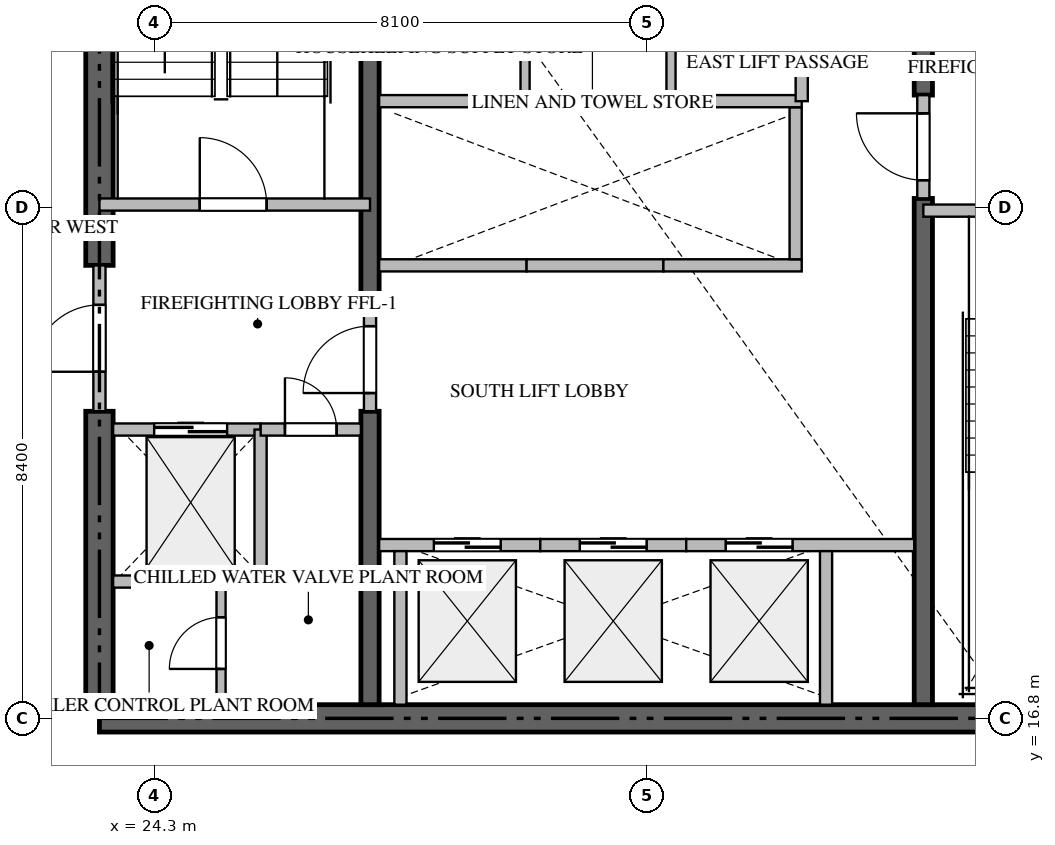
"""IFC4 building model, lengths in metres.
Left out: names, types, materials, properties, quantities, classifications, styles, units other than length and angle.
Written with IfcOpenShell. Run it as: python <this file> out.ifc"""

import sys

from ifc_helpers import new_model, si_unit, direction, frame, frame_2d, origin, place, context, subcontext, project, spatial, rectangle, extrude, source, transform, mapped, element, fill, save


model = new_model("IFC4")
c1 = context("Model", 3, precision=1e-05, world=origin(), true_north=direction((0.0, 1.0)))
c2 = subcontext(c1, "Body", "Model", "MODEL_VIEW")
j1 = project(units=[si_unit("LENGTHUNIT", "METRE"), si_unit("PLANEANGLEUNIT", "RADIAN")], contexts=[c1])
p1 = place(None, origin())
s1 = spatial("IfcSite", under=j1, at=p1, CompositionType="ELEMENT")
p2 = place(p1, origin())
s2 = spatial("IfcBuilding", under=s1, at=p2, CompositionType="ELEMENT")
p3 = place(p2, frame((0.0, 0.0, 79.2)))
s3 = spatial("IfcBuildingStorey", under=s2, at=p3, CompositionType="ELEMENT", Elevation=79.2)
p4 = place(p3, frame((23.4, 16.8, -0.26), z_axis=(0.0, 0.0, 1.0), x_axis=(1.0, 0.0, 0.0)))
e1 = element("IfcWall", 1, at=p4, inside=s3, PredefinedType="SHEAR", context=c2, shape_type="SweptSolid", body=[
    extrude(rectangle(XDim=18.0, YDim=0.45, at=frame_2d((9.0, 0.0))), origin(), (0.0, 0.0, 1.0), 3.748),
])
p5 = place(p3, frame((23.4, 17.025, -0.26), z_axis=(0.0, 0.0, 1.0), x_axis=(0.0, 1.0, 0.0)))
e2 = element("IfcWall", 2, at=p5, inside=s3, PredefinedType="SHEAR", context=c2, shape_type="SweptSolid", body=[
    extrude(rectangle(XDim=4.825, YDim=0.45, at=frame_2d((2.413, 0.0))), origin(), (0.0, 0.0, 1.0), 3.748),
])
p6 = place(p3, frame((23.4, 24.25, -0.26), z_axis=(0.0, 0.0, 1.0), x_axis=(0.0, 1.0, 0.0)))
e3 = element("IfcWall", 3, at=p6, inside=s3, PredefinedType="SHEAR", context=c2, shape_type="SweptSolid", body=[
    extrude(rectangle(XDim=9.125, YDim=0.45, at=frame_2d((4.562, 0.0))), origin(), (0.0, 0.0, 1.0), 3.748),
])
p7 = place(p3, frame((27.85, 17.025, -0.26), z_axis=(0.0, 0.0, 1.0), x_axis=(0.0, 1.0, 0.0)))
e4 = element("IfcWall", 4, at=p7, inside=s3, PredefinedType="SHEAR", context=c2, shape_type="SweptSolid", body=[
    extrude(rectangle(XDim=4.825, YDim=0.3, at=frame_2d((2.413, 0.0))), origin(), (0.0, 0.0, 1.0), 3.748),
])
p8 = place(p3, frame((27.85, 23.55, -0.26), z_axis=(0.0, 0.0, 1.0), x_axis=(0.0, 1.0, 0.0)))
e5 = element("IfcWall", 5, at=p8, inside=s3, PredefinedType="SHEAR", context=c2, shape_type="SweptSolid", body=[
    extrude(rectangle(XDim=9.825, YDim=0.3, at=frame_2d((4.913, 0.0))), origin(), (0.0, 0.0, 1.0), 3.748),
])
p9 = place(p3, frame((36.95, 17.025, -0.26), z_axis=(0.0, 0.0, 1.0), x_axis=(0.0, 1.0, 0.0)))
e6 = element("IfcWall", 6, at=p9, inside=s3, PredefinedType="SHEAR", context=c2, shape_type="SweptSolid", body=[
    extrude(rectangle(XDim=8.325, YDim=0.3, at=frame_2d((4.163, 0.0))), origin(), (0.0, 0.0, 1.0), 3.748),
])
p10 = place(p3, frame((36.95, 27.05, -0.26), z_axis=(0.0, 0.0, 1.0), x_axis=(0.0, 1.0, 0.0)))
e7 = element("IfcWall", 7, at=p10, inside=s3, PredefinedType="SHEAR", context=c2, shape_type="SweptSolid", body=[
    extrude(rectangle(XDim=6.325, YDim=0.3, at=frame_2d((3.163, 0.0))), origin(), (0.0, 0.0, 1.0), 3.748),
])
p11 = place(p3, frame((23.4, 25.25, 0.0), z_axis=(0.0, 0.0, 1.0), x_axis=(1.0, 0.0, 0.0)))
e8 = element("IfcWall", 8, at=p11, inside=s3, PredefinedType="STANDARD", context=c2, shape_type="SweptSolid", body=[
    extrude(rectangle(XDim=4.45, YDim=0.2, at=frame_2d((2.225, 0.0))), origin(), (0.0, 0.0, 1.0), 3.49),
])
p12 = place(p11, frame((1.65, 0.0, 0.0)))
e9 = element("IfcOpeningElement", 9, at=p12, cuts=e8, PredefinedType="OPENING", context=c2, shape_type="SweptSolid", body=[
    extrude(rectangle(XDim=1.1, YDim=2.15, at=frame_2d((0.55, 1.075))), frame((0.0, 0.11, 0.0), z_axis=(0.0, -1.0, 0.0), x_axis=(1.0, 0.0, 0.0)), (0.0, 0.0, 1.0), 0.22),
])
p13 = place(p3, frame((36.95, 25.15, 0.0), z_axis=(0.0, 0.0, 1.0), x_axis=(1.0, 0.0, 0.0)))
e10 = element("IfcWall", 10, at=p13, inside=s3, PredefinedType="STANDARD", context=c2, shape_type="SweptSolid", body=[
    extrude(rectangle(XDim=4.45, YDim=0.2, at=frame_2d((2.225, 0.0))), origin(), (0.0, 0.0, 1.0), 3.49),
])
p14 = place(p13, frame((1.65, 0.0, 0.0)))
e11 = element("IfcOpeningElement", 11, at=p14, cuts=e10, PredefinedType="OPENING", context=c2, shape_type="SweptSolid", body=[
    extrude(rectangle(XDim=1.1, YDim=2.15, at=frame_2d((0.55, 1.075))), frame((0.0, 0.11, 0.0), z_axis=(0.0, -1.0, 0.0), x_axis=(1.0, 0.0, 0.0)), (0.0, 0.0, 1.0), 0.22),
])
p15 = place(p3, frame((23.625, 21.55, 0.0), z_axis=(0.0, 0.0, 1.0), x_axis=(1.0, 0.0, 0.0)))
e12 = element("IfcWall", 12, at=p15, inside=s3, PredefinedType="STANDARD", context=c2, shape_type="SweptSolid", body=[
    extrude(rectangle(XDim=2.425, YDim=0.2, at=frame_2d((1.212, 0.0))), origin(), (0.0, 0.0, 1.0), 3.49),
])
p16 = place(p15, frame((0.675, 0.0, 0.0)))
e13 = element("IfcOpeningElement", 13, at=p16, cuts=e12, PredefinedType="OPENING", context=c2, shape_type="SweptSolid", body=[
    extrude(rectangle(XDim=1.2, YDim=2.2, at=frame_2d((0.6, 1.1))), frame((0.0, 0.11, 0.0), z_axis=(0.0, -1.0, 0.0), x_axis=(1.0, 0.0, 0.0)), (0.0, 0.0, 1.0), 0.22),
])
p17 = place(p3, frame((28.0, 19.65, 0.0), z_axis=(0.0, 0.0, 1.0), x_axis=(1.0, 0.0, 0.0)))
e14 = element("IfcWall", 14, at=p17, inside=s3, PredefinedType="STANDARD", context=c2, shape_type="SweptSolid", body=[
    extrude(rectangle(XDim=2.65, YDim=0.2, at=frame_2d((1.325, 0.0))), origin(), (0.0, 0.0, 1.0), 3.49),
])
p18 = place(p17, frame((0.9, 0.0, 0.0)))
e15 = element("IfcOpeningElement", 15, at=p18, cuts=e14, PredefinedType="OPENING", context=c2, shape_type="SweptSolid", body=[
    extrude(rectangle(XDim=1.1, YDim=2.2, at=frame_2d((0.55, 1.1))), frame((0.0, 0.11, 0.0), z_axis=(0.0, -1.0, 0.0), x_axis=(1.0, 0.0, 0.0)), (0.0, 0.0, 1.0), 0.22),
])
p19 = place(p3, frame((28.35, 17.025, 0.0), z_axis=(0.0, 0.0, 1.0), x_axis=(0.0, 1.0, 0.0)))
e16 = element("IfcWall", 16, at=p19, inside=s3, PredefinedType="STANDARD", context=c2, shape_type="SweptSolid", body=[
    extrude(rectangle(XDim=2.525, YDim=0.2, at=frame_2d((1.263, 0.0))), origin(), (0.0, 0.0, 1.0), 3.49),
])
p20 = place(p3, frame((30.65, 19.65, 0.0), z_axis=(0.0, 0.0, 1.0), x_axis=(1.0, 0.0, 0.0)))
e17 = element("IfcWall", 17, at=p20, inside=s3, PredefinedType="STANDARD", context=c2, shape_type="SweptSolid", body=[
    extrude(rectangle(XDim=2.4, YDim=0.2, at=frame_2d((1.2, 0.0))), origin(), (0.0, 0.0, 1.0), 3.49),
])
p21 = place(p20, frame((0.65, 0.0, 0.0)))
e18 = element("IfcOpeningElement", 18, at=p21, cuts=e17, PredefinedType="OPENING", context=c2, shape_type="SweptSolid", body=[
    extrude(rectangle(XDim=1.1, YDim=2.2, at=frame_2d((0.55, 1.1))), frame((0.0, 0.11, 0.0), z_axis=(0.0, -1.0, 0.0), x_axis=(1.0, 0.0, 0.0)), (0.0, 0.0, 1.0), 0.22),
])
p22 = place(p3, frame((33.05, 19.65, 0.0), z_axis=(0.0, 0.0, 1.0), x_axis=(1.0, 0.0, 0.0)))
e19 = element("IfcWall", 19, at=p22, inside=s3, PredefinedType="STANDARD", context=c2, shape_type="SweptSolid", body=[
    extrude(rectangle(XDim=3.75, YDim=0.2, at=frame_2d((1.875, 0.0))), origin(), (0.0, 0.0, 1.0), 3.49),
])
p23 = place(p22, frame((0.65, 0.0, 0.0)))
e20 = element("IfcOpeningElement", 20, at=p23, cuts=e19, PredefinedType="OPENING", context=c2, shape_type="SweptSolid", body=[
    extrude(rectangle(XDim=1.1, YDim=2.2, at=frame_2d((0.55, 1.1))), frame((0.0, 0.11, 0.0), z_axis=(0.0, -1.0, 0.0), x_axis=(1.0, 0.0, 0.0)), (0.0, 0.0, 1.0), 0.22),
])
p24 = place(p3, frame((35.35, 17.025, 0.0), z_axis=(0.0, 0.0, 1.0), x_axis=(0.0, 1.0, 0.0)))
e21 = element("IfcWall", 21, at=p24, inside=s3, PredefinedType="STANDARD", context=c2, shape_type="SweptSolid", body=[
    extrude(rectangle(XDim=2.525, YDim=0.2, at=frame_2d((1.263, 0.0))), origin(), (0.0, 0.0, 1.0), 3.49),
])
p25 = place(p3, frame((28.0, 24.25, 0.0), z_axis=(0.0, 0.0, 1.0), x_axis=(1.0, 0.0, 0.0)))
e22 = element("IfcWall", 22, at=p25, inside=s3, PredefinedType="STANDARD", context=c2, shape_type="SweptSolid", body=[
    extrude(rectangle(XDim=2.425, YDim=0.2, at=frame_2d((1.212, 0.0))), origin(), (0.0, 0.0, 1.0), 3.49),
])
p26 = place(p3, frame((30.425, 24.25, 0.0), z_axis=(0.0, 0.0, 1.0), x_axis=(1.0, 0.0, 0.0)))
e23 = element("IfcWall", 23, at=p26, inside=s3, PredefinedType="STANDARD", context=c2, shape_type="SweptSolid", body=[
    extrude(rectangle(XDim=2.25, YDim=0.2, at=frame_2d((1.125, 0.0))), origin(), (0.0, 0.0, 1.0), 3.49),
])
p27 = place(p3, frame((32.675, 24.25, 0.0), z_axis=(0.0, 0.0, 1.0), x_axis=(1.0, 0.0, 0.0)))
e24 = element("IfcWall", 24, at=p27, inside=s3, PredefinedType="STANDARD", context=c2, shape_type="SweptSolid", body=[
    extrude(rectangle(XDim=2.275, YDim=0.2, at=frame_2d((1.137, 0.0))), origin(), (0.0, 0.0, 1.0), 3.49),
])
for number, where, z_axis, x_axis in (
    (25, (34.85, 24.35, 0.0), (0.0, 0.0, 1.0), (0.0, 1.0, 0.0)),
    (26, (26.05, 19.05, 0.0), (0.0, 0.0, 1.0), (0.0, 1.0, 0.0)),
):
    element("IfcWall", number, at=place(p3, frame(where, z_axis=z_axis, x_axis=x_axis)), inside=s3, PredefinedType="STANDARD", context=c2, shape_type="SweptSolid", body=[
        extrude(rectangle(XDim=2.5, YDim=0.2, at=frame_2d((1.25, 0.0))), origin(), (0.0, 0.0, 1.0), 3.49),
    ])
p28 = place(p3, frame((23.625, 19.05, 0.0), z_axis=(0.0, 0.0, 1.0), x_axis=(1.0, 0.0, 0.0)))
e27 = element("IfcWall", 27, at=p28, inside=s3, PredefinedType="STANDARD", context=c2, shape_type="SweptSolid", body=[
    extrude(rectangle(XDim=2.425, YDim=0.2, at=frame_2d((1.212, 0.0))), origin(), (0.0, 0.0, 1.0), 3.49),
])
p29 = place(p3, frame((26.052, 21.55, 0.0), z_axis=(0.0, 0.0, 1.0), x_axis=(1.0, 0.0, 0.0)))
e28 = element("IfcWall", 28, at=p29, inside=s3, PredefinedType="STANDARD", context=c2, shape_type="SweptSolid", body=[
    extrude(rectangle(XDim=1.648, YDim=0.2, at=frame_2d((0.824, 0.0))), origin(), (0.0, 0.0, 1.0), 3.49),
])
p30 = place(p29, frame((0.399, 0.0, 0.0)))
e29 = element("IfcOpeningElement", 29, at=p30, cuts=e28, PredefinedType="OPENING", context=c2, shape_type="SweptSolid", body=[
    extrude(rectangle(XDim=0.85, YDim=2.1, at=frame_2d((0.425, 1.05))), frame((0.0, 0.11, 0.0), z_axis=(0.0, -1.0, 0.0), x_axis=(1.0, 0.0, 0.0)), (0.0, 0.0, 1.0), 0.22),
])
p31 = place(p3, frame((23.4, 21.852, 0.0), z_axis=(0.0, 0.0, 1.0), x_axis=(0.0, 1.0, 0.0)))
e30 = element("IfcWall", 30, at=p31, inside=s3, PredefinedType="STANDARD", context=c2, shape_type="SweptSolid", body=[
    extrude(rectangle(XDim=2.396, YDim=0.2, at=frame_2d((1.198, 0.0))), origin(), (0.0, 0.0, 1.0), 3.49),
])
p32 = place(p31, frame((0.648, 0.0, 0.0)))
e31 = element("IfcOpeningElement", 31, at=p32, cuts=e30, PredefinedType="OPENING", context=c2, shape_type="SweptSolid", body=[
    extrude(rectangle(XDim=1.1, YDim=2.15, at=frame_2d((0.55, 1.075))), frame((0.0, 0.11, 0.0), z_axis=(0.0, -1.0, 0.0), x_axis=(1.0, 0.0, 0.0)), (0.0, 0.0, 1.0), 0.22),
])
p33 = place(p3, frame((27.85, 21.852, 0.0), z_axis=(0.0, 0.0, 1.0), x_axis=(0.0, 1.0, 0.0)))
e32 = element("IfcWall", 32, at=p33, inside=s3, PredefinedType="STANDARD", context=c2, shape_type="SweptSolid", body=[
    extrude(rectangle(XDim=1.696, YDim=0.2, at=frame_2d((0.848, 0.0))), origin(), (0.0, 0.0, 1.0), 3.49),
])
p34 = place(p33, frame((0.298, 0.0, 0.0)))
e33 = element("IfcOpeningElement", 33, at=p34, cuts=e32, PredefinedType="OPENING", context=c2, shape_type="SweptSolid", body=[
    extrude(rectangle(XDim=1.1, YDim=2.15, at=frame_2d((0.55, 1.075))), frame((0.0, 0.11, 0.0), z_axis=(0.0, -1.0, 0.0), x_axis=(1.0, 0.0, 0.0)), (0.0, 0.0, 1.0), 0.22),
])
p35 = place(p3, frame((36.95, 25.352, 0.0), z_axis=(0.0, 0.0, 1.0), x_axis=(0.0, 1.0, 0.0)))
e34 = element("IfcWall", 34, at=p35, inside=s3, PredefinedType="STANDARD", context=c2, shape_type="SweptSolid", body=[
    extrude(rectangle(XDim=1.696, YDim=0.2, at=frame_2d((0.848, 0.0))), origin(), (0.0, 0.0, 1.0), 3.49),
])
p36 = place(p35, frame((0.298, 0.0, 0.0)))
e35 = element("IfcOpeningElement", 35, at=p36, cuts=e34, PredefinedType="OPENING", context=c2, shape_type="SweptSolid", body=[
    extrude(rectangle(XDim=1.1, YDim=2.15, at=frame_2d((0.55, 1.075))), frame((0.0, 0.11, 0.0), z_axis=(0.0, -1.0, 0.0), x_axis=(1.0, 0.0, 0.0)), (0.0, 0.0, 1.0), 0.22),
])
p37 = place(p3, frame((28.0, 26.95, 0.0), z_axis=(0.0, 0.0, 1.0), x_axis=(1.0, 0.0, 0.0)))
e36 = element("IfcWall", 36, at=p37, inside=s3, PredefinedType="STANDARD", context=c2, shape_type="SweptSolid", body=[
    extrude(rectangle(XDim=6.95, YDim=0.2, at=frame_2d((3.475, 0.0))), origin(), (0.0, 0.0, 1.0), 3.49),
])
p38 = place(p3, frame((25.4, 17.025, 0.0), z_axis=(0.0, 0.0, 1.0), x_axis=(0.0, 1.0, 0.0)))
e37 = element("IfcWall", 37, at=p38, inside=s3, PredefinedType="PARTITIONING", context=c2, shape_type="SweptSolid", body=[
    extrude(rectangle(XDim=2.025, YDim=0.15, at=frame_2d((1.013, 0.0))), origin(), (0.0, 0.0, 1.0), 3.49),
])
p39 = place(p38, frame((0.588, 0.0, 0.0)))
e38 = element("IfcOpeningElement", 38, at=p39, cuts=e37, PredefinedType="OPENING", context=c2, shape_type="SweptSolid", body=[
    extrude(rectangle(XDim=0.85, YDim=2.1, at=frame_2d((0.425, 1.05))), frame((0.0, 0.085, 0.0), z_axis=(0.0, -1.0, 0.0), x_axis=(1.0, 0.0, 0.0)), (0.0, 0.0, 1.0), 0.17),
])
p40 = place(p3, frame((34.95, 26.95, 0.0), z_axis=(0.0, 0.0, 1.0), x_axis=(0.0, 1.0, 0.0)))
e39 = element("IfcWall", 39, at=p40, inside=s3, PredefinedType="STANDARD", context=c2, shape_type="SweptSolid", body=[
    extrude(rectangle(XDim=3.6, YDim=0.2, at=frame_2d((1.8, 0.0))), origin(), (0.0, 0.0, 1.0), 3.49),
])
p41 = place(p40, frame((1.35, 0.0, 0.0)))
e40 = element("IfcOpeningElement", 40, at=p41, cuts=e39, PredefinedType="OPENING", context=c2, shape_type="SweptSolid", body=[
    extrude(rectangle(XDim=0.9, YDim=2.1, at=frame_2d((0.45, 1.05))), frame((0.0, 0.11, 0.0), z_axis=(0.0, -1.0, 0.0), x_axis=(1.0, 0.0, 0.0)), (0.0, 0.0, 1.0), 0.22),
])
p42 = place(p3, frame((32.8, 26.95, 0.0), z_axis=(0.0, 0.0, 1.0), x_axis=(0.0, 1.0, 0.0)))
e41 = element("IfcWall", 41, at=p42, inside=s3, PredefinedType="PARTITIONING", context=c2, shape_type="SweptSolid", body=[
    extrude(rectangle(XDim=3.6, YDim=0.15, at=frame_2d((1.8, 0.0))), origin(), (0.0, 0.0, 1.0), 3.49),
])
p43 = place(p42, frame((1.375, 0.0, 0.0)))
e42 = element("IfcOpeningElement", 42, at=p43, cuts=e41, PredefinedType="OPENING", context=c2, shape_type="SweptSolid", body=[
    extrude(rectangle(XDim=0.85, YDim=2.1, at=frame_2d((0.425, 1.05))), frame((0.0, 0.085, 0.0), z_axis=(0.0, -1.0, 0.0), x_axis=(1.0, 0.0, 0.0)), (0.0, 0.0, 1.0), 0.17),
])
p44 = place(p3, frame((30.4, 26.95, 0.0), z_axis=(0.0, 0.0, 1.0), x_axis=(0.0, 1.0, 0.0)))
e43 = element("IfcWall", 43, at=p44, inside=s3, PredefinedType="PARTITIONING", context=c2, shape_type="SweptSolid", body=[
    extrude(rectangle(XDim=3.6, YDim=0.15, at=frame_2d((1.8, 0.0))), origin(), (0.0, 0.0, 1.0), 3.49),
])
p45 = place(p44, frame((1.375, 0.0, 0.0)))
e44 = element("IfcOpeningElement", 44, at=p45, cuts=e43, PredefinedType="OPENING", context=c2, shape_type="SweptSolid", body=[
    extrude(rectangle(XDim=0.85, YDim=2.1, at=frame_2d((0.425, 1.05))), frame((0.0, 0.085, 0.0), z_axis=(0.0, -1.0, 0.0), x_axis=(1.0, 0.0, 0.0)), (0.0, 0.0, 1.0), 0.17),
])
m1 = source(origin(), c2, "Body", "SweptSolid", [
    extrude(rectangle(XDim=1.1, YDim=2.15, at=frame_2d((0.55, 1.075))), frame((0.0, 0.025, 0.0), z_axis=(0.0, -1.0, 0.0), x_axis=(1.0, 0.0, 0.0)), (0.0, 0.0, 1.0), 0.05),
])
p46 = place(p12, origin())
e45 = element("IfcDoor", 45, at=p46, inside=s3, OperationType="SINGLE_SWING_LEFT", PredefinedType="DOOR", context=c2, shape_type="MappedRepresentation", body=[
    mapped(m1, transform((0.0, 0.0, 0.0), scale=1.0)),
])
fill(e9, e45)
m2 = source(origin(), c2, "Body", "SweptSolid", [
    extrude(rectangle(XDim=1.2, YDim=2.2, at=frame_2d((0.6, 1.1))), frame((0.0, 0.025, 0.0), z_axis=(0.0, -1.0, 0.0), x_axis=(1.0, 0.0, 0.0)), (0.0, 0.0, 1.0), 0.05),
])
p47 = place(p16, origin())
e46 = element("IfcDoor", 46, at=p47, inside=s3, OperationType="DOUBLE_DOOR_SLIDING", PredefinedType="DOOR", context=c2, shape_type="MappedRepresentation", body=[
    mapped(m2, transform((0.0, 0.0, 0.0), scale=1.0)),
])
fill(e13, e46)
m3 = source(origin(), c2, "Body", "SweptSolid", [
    extrude(rectangle(XDim=1.1, YDim=2.2, at=frame_2d((0.55, 1.1))), frame((0.0, 0.025, 0.0), z_axis=(0.0, -1.0, 0.0), x_axis=(1.0, 0.0, 0.0)), (0.0, 0.0, 1.0), 0.05),
])
p48 = place(p18, origin())
e47 = element("IfcDoor", 47, at=p48, inside=s3, OperationType="DOUBLE_DOOR_SLIDING", PredefinedType="DOOR", context=c2, shape_type="MappedRepresentation", body=[
    mapped(m3, transform((0.0, 0.0, 0.0), scale=1.0)),
])
fill(e15, e47)
p49 = place(p21, origin())
e48 = element("IfcDoor", 48, at=p49, inside=s3, OperationType="DOUBLE_DOOR_SLIDING", PredefinedType="DOOR", context=c2, shape_type="MappedRepresentation", body=[
    mapped(m3, transform((0.0, 0.0, 0.0), scale=1.0)),
])
fill(e18, e48)
p50 = place(p23, origin())
e49 = element("IfcDoor", 49, at=p50, inside=s3, OperationType="DOUBLE_DOOR_SLIDING", PredefinedType="DOOR", context=c2, shape_type="MappedRepresentation", body=[
    mapped(m3, transform((0.0, 0.0, 0.0), scale=1.0)),
])
fill(e20, e49)
m4 = source(origin(), c2, "Body", "SweptSolid", [
    extrude(rectangle(XDim=0.85, YDim=2.1, at=frame_2d((0.425, 1.05))), frame((0.0, 0.025, 0.0), z_axis=(0.0, -1.0, 0.0), x_axis=(1.0, 0.0, 0.0)), (0.0, 0.0, 1.0), 0.05),
])
p51 = place(p30, origin())
e50 = element("IfcDoor", 50, at=p51, inside=s3, OperationType="SINGLE_SWING_LEFT", PredefinedType="DOOR", context=c2, shape_type="MappedRepresentation", body=[
    mapped(m4, transform((0.0, 0.0, 0.0), scale=1.0)),
])
fill(e29, e50)
p52 = place(p32, origin())
e51 = element("IfcDoor", 51, at=p52, inside=s3, OperationType="SINGLE_SWING_LEFT", PredefinedType="DOOR", context=c2, shape_type="MappedRepresentation", body=[
    mapped(m1, transform((0.0, 0.0, 0.0), scale=1.0)),
])
fill(e31, e51)
p53 = place(p34, origin())
e52 = element("IfcDoor", 52, at=p53, inside=s3, OperationType="SINGLE_SWING_LEFT", PredefinedType="DOOR", context=c2, shape_type="MappedRepresentation", body=[
    mapped(m1, transform((0.0, 0.0, 0.0), scale=1.0)),
])
fill(e33, e52)
p54 = place(p36, origin())
e53 = element("IfcDoor", 53, at=p54, inside=s3, OperationType="SINGLE_SWING_RIGHT", PredefinedType="DOOR", context=c2, shape_type="MappedRepresentation", body=[
    mapped(m1, transform((0.0, 0.0, 0.0), scale=1.0)),
])
fill(e35, e53)
p55 = place(p39, origin())
e54 = element("IfcDoor", 54, at=p55, inside=s3, OperationType="SINGLE_SWING_LEFT", PredefinedType="DOOR", context=c2, shape_type="MappedRepresentation", body=[
    mapped(m4, transform((0.0, 0.0, 0.0), scale=1.0)),
])
fill(e38, e54)
save(model, sys.argv[1])
